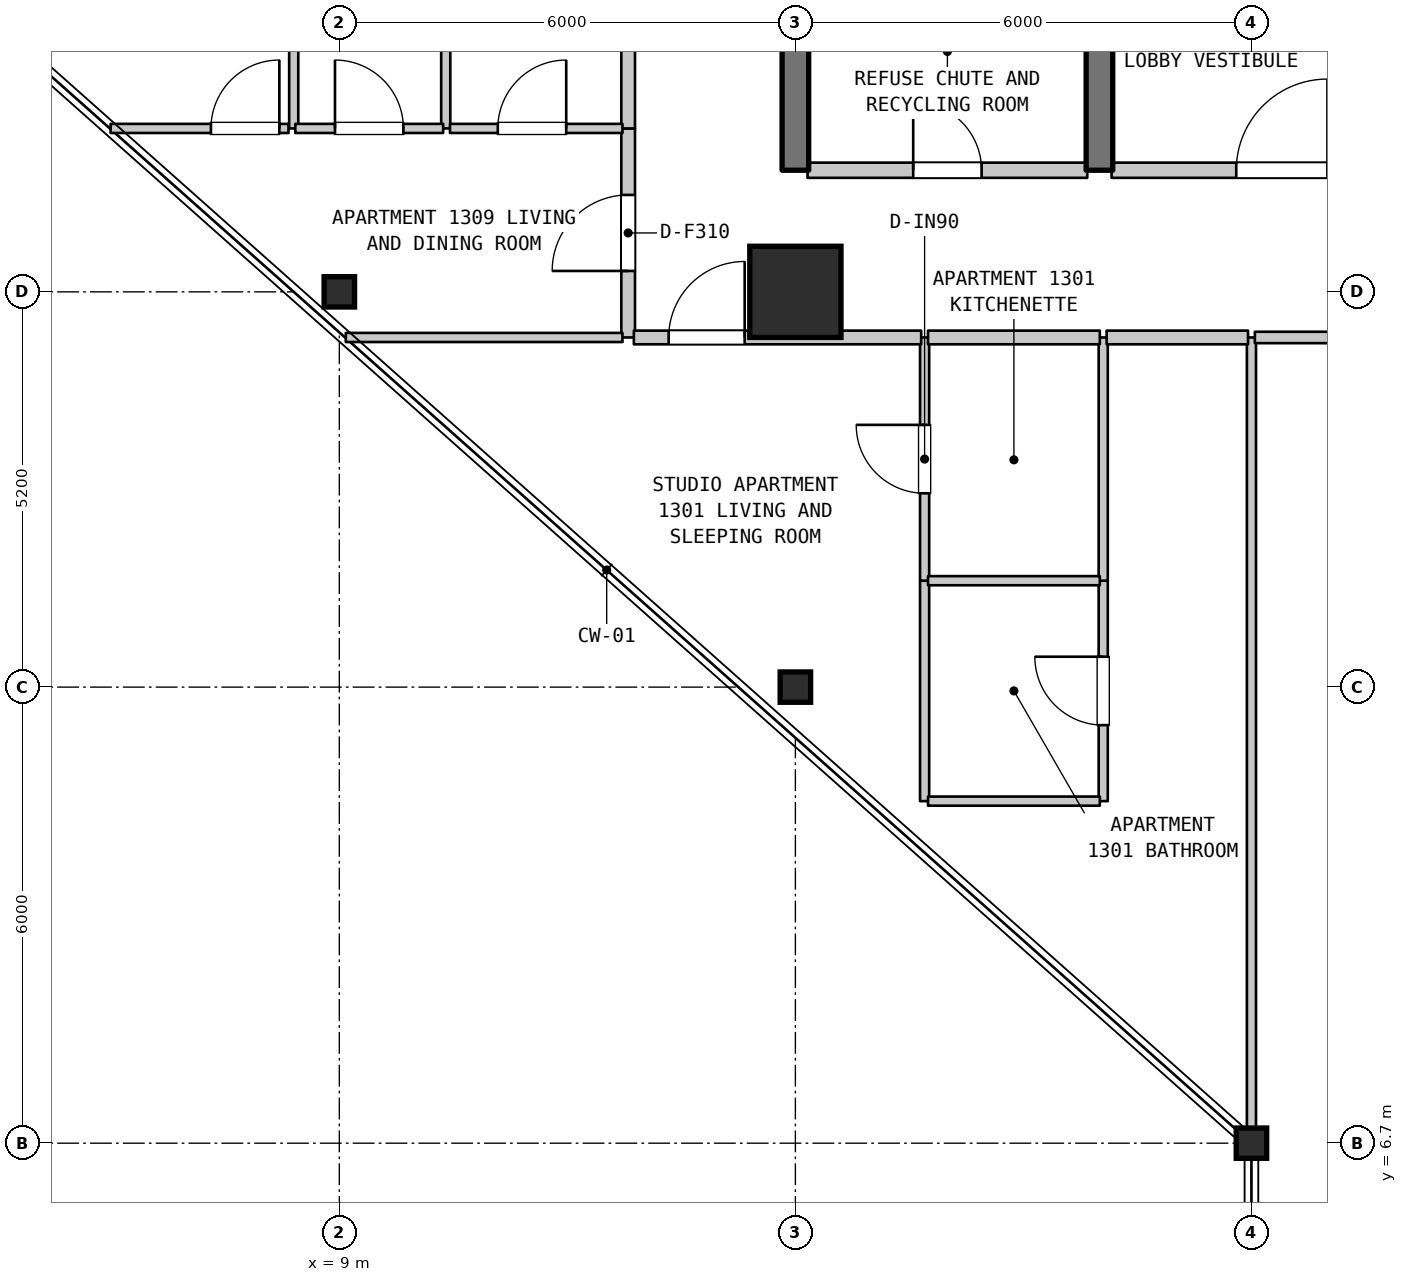
"""IFC4 building model, lengths in metres.
Left out: names, types, materials, properties, quantities, classifications, styles, units other than length and angle.
Written with IfcOpenShell. Run it as: python <this file> out.ifc"""

import sys

from ifc_helpers import new_model, si_unit, direction, frame, frame_2d, origin, origin_2d, place, context, subcontext, project, spatial, rectangle, i_section, extrude, element, fill, save


model = new_model("IFC4")
c1 = context("Model", 3, precision=1e-05, world=origin(), true_north=direction((0.0, 1.0)))
c2 = subcontext(c1, "Body", "Model", "MODEL_VIEW")
j1 = project(units=[si_unit("LENGTHUNIT", "METRE"), si_unit("PLANEANGLEUNIT", "RADIAN")], contexts=[c1])
p1 = place(None, origin())
s1 = spatial("IfcSite", under=j1, at=p1, CompositionType="ELEMENT")
p2 = place(p1, origin())
s2 = spatial("IfcBuilding", under=s1, at=p2, CompositionType="ELEMENT")
p3 = place(p2, frame((0.0, 0.0, 57.3)))
s3 = spatial("IfcBuildingStorey", under=s2, at=p3, CompositionType="ELEMENT", Elevation=57.3)
for number, where, z_axis, x_axis in (
    (1, (9.0, 17.9, 0.0), (0.0, 0.0, 1.0), (1.0, 0.0, 0.0)),
    (2, (15.0, 12.7, 0.0), (0.0, 0.0, 1.0), (1.0, 0.0, 0.0)),
):
    element("IfcColumn", number, at=place(p3, frame(where, z_axis=z_axis, x_axis=x_axis)), inside=s3, PredefinedType="COLUMN", context=c2, shape_type="SweptSolid", body=[
        extrude(i_section(OverallWidth=0.401, OverallDepth=0.399, WebThickness=0.025, FlangeThickness=0.04, FilletRadius=0.015, at=origin_2d()), origin(), (0.0, 0.0, 1.0), 3.7),
    ])
p4 = place(p3, frame((15.0, 17.9, 0.0), z_axis=(0.0, 0.0, 1.0), x_axis=(1.0, 0.0, 0.0)))
e3 = element("IfcColumn", 3, at=p4, inside=s3, PredefinedType="COLUMN", context=c2, shape_type="SweptSolid", body=[
    extrude(rectangle(XDim=1.2, YDim=1.2, at=origin_2d()), origin(), (0.0, 0.0, 1.0), 3.7),
])
p5 = place(p3, frame((21.0, 6.7, 0.0), z_axis=(0.0, 0.0, 1.0), x_axis=(1.0, 0.0, 0.0)))
e4 = element("IfcColumn", 4, at=p5, inside=s3, PredefinedType="COLUMN", context=c2, shape_type="SweptSolid", body=[
    extrude(i_section(OverallWidth=0.401, OverallDepth=0.399, WebThickness=0.025, FlangeThickness=0.04, FilletRadius=0.015, at=origin_2d()), origin(), (0.0, 0.0, 1.0), 3.7),
])
for number, where, z_axis, x_axis in (
    (5, (8.4, 20.05, 0.0), (0.0, 0.0, 1.0), (0.0, 1.0, 0.0)),
    (6, (10.4, 20.05, 0.0), (0.0, 0.0, 1.0), (0.0, 1.0, 0.0)),
):
    element("IfcWall", number, at=place(p3, frame(where, z_axis=z_axis, x_axis=x_axis)), inside=s3, PredefinedType="PARTITIONING", context=c2, shape_type="SweptSolid", body=[
        extrude(rectangle(XDim=3.36, YDim=0.12, at=frame_2d((1.68, 0.0))), origin(), (0.0, 0.0, 1.0), 3.28),
    ])
p6 = place(p3, frame((12.8, 17.3, 0.0), z_axis=(0.0, 0.0, 1.0), x_axis=(0.0, 1.0, 0.0)))
e7 = element("IfcWall", 7, at=p6, inside=s3, PredefinedType="STANDARD", context=c2, shape_type="SweptSolid", body=[
    extrude(rectangle(XDim=2.75, YDim=0.18, at=frame_2d((1.375, 0.0))), origin(), (0.0, 0.0, 1.0), 3.28),
])
p7 = place(p6, frame((0.875, 0.0, 0.0)))
e8 = element("IfcOpeningElement", 8, at=p7, cuts=e7, PredefinedType="OPENING", context=c2, shape_type="SweptSolid", body=[
    extrude(rectangle(XDim=1.0, YDim=2.15, at=frame_2d((0.5, 1.075))), frame((0.0, 0.1, 0.0), z_axis=(0.0, -1.0, 0.0), x_axis=(1.0, 0.0, 0.0)), (0.0, 0.0, 1.0), 0.2),
])
p8 = place(p3, frame((12.8, 20.05, 0.0), z_axis=(0.0, 0.0, 1.0), x_axis=(0.0, 1.0, 0.0)))
e9 = element("IfcWall", 9, at=p8, inside=s3, PredefinedType="STANDARD", context=c2, shape_type="SweptSolid", body=[
    extrude(rectangle(XDim=3.36, YDim=0.18, at=frame_2d((1.68, 0.0))), origin(), (0.0, 0.0, 1.0), 3.28),
])
p9 = place(p3, frame((15.0, 19.5, 0.0), z_axis=(0.0, 0.0, 1.0), x_axis=(0.0, 1.0, 0.0)))
e10 = element("IfcWall", 10, at=p9, inside=s3, PredefinedType="SHEAR", context=c2, shape_type="SweptSolid", body=[
    extrude(rectangle(XDim=3.2, YDim=0.35, at=frame_2d((1.6, 0.0))), origin(), (0.0, 0.0, 1.0), 3.28),
])
p10 = place(p3, frame((16.7, 11.2, 0.0), z_axis=(0.0, 0.0, 1.0), x_axis=(0.0, 1.0, 0.0)))
e11 = element("IfcWall", 11, at=p10, inside=s3, PredefinedType="PARTITIONING", context=c2, shape_type="SweptSolid", body=[
    extrude(rectangle(XDim=2.9, YDim=0.12, at=frame_2d((1.45, 0.0))), origin(), (0.0, 0.0, 1.0), 3.28),
])
p11 = place(p3, frame((16.7, 14.1, 0.0), z_axis=(0.0, 0.0, 1.0), x_axis=(0.0, 1.0, 0.0)))
e12 = element("IfcWall", 12, at=p11, inside=s3, PredefinedType="PARTITIONING", context=c2, shape_type="SweptSolid", body=[
    extrude(rectangle(XDim=3.2, YDim=0.12, at=frame_2d((1.6, 0.0))), origin(), (0.0, 0.0, 1.0), 3.28),
])
p12 = place(p11, frame((1.15, 0.0, 0.0)))
e13 = element("IfcOpeningElement", 13, at=p12, cuts=e12, PredefinedType="OPENING", context=c2, shape_type="SweptSolid", body=[
    extrude(rectangle(XDim=0.9, YDim=2.15, at=frame_2d((0.45, 1.075))), frame((0.0, 0.07, 0.0), z_axis=(0.0, -1.0, 0.0), x_axis=(1.0, 0.0, 0.0)), (0.0, 0.0, 1.0), 0.14),
])
p13 = place(p3, frame((19.0, 19.5, 0.0), z_axis=(0.0, 0.0, 1.0), x_axis=(0.0, 1.0, 0.0)))
e14 = element("IfcWall", 14, at=p13, inside=s3, PredefinedType="SHEAR", context=c2, shape_type="SweptSolid", body=[
    extrude(rectangle(XDim=3.2, YDim=0.35, at=frame_2d((1.6, 0.0))), origin(), (0.0, 0.0, 1.0), 3.28),
])
p14 = place(p3, frame((19.05, 11.2, 0.0), z_axis=(0.0, 0.0, 1.0), x_axis=(0.0, 1.0, 0.0)))
e15 = element("IfcWall", 15, at=p14, inside=s3, PredefinedType="PARTITIONING", context=c2, shape_type="SweptSolid", body=[
    extrude(rectangle(XDim=2.9, YDim=0.12, at=frame_2d((1.45, 0.0))), origin(), (0.0, 0.0, 1.0), 3.28),
])
p15 = place(p14, frame((1.0, 0.0, 0.0)))
e16 = element("IfcOpeningElement", 16, at=p15, cuts=e15, PredefinedType="OPENING", context=c2, shape_type="SweptSolid", body=[
    extrude(rectangle(XDim=0.9, YDim=2.1, at=frame_2d((0.45, 1.05))), frame((0.0, 0.07, 0.0), z_axis=(0.0, -1.0, 0.0), x_axis=(1.0, 0.0, 0.0)), (0.0, 0.0, 1.0), 0.14),
])
p16 = place(p3, frame((19.05, 14.1, 0.0), z_axis=(0.0, 0.0, 1.0), x_axis=(0.0, 1.0, 0.0)))
e17 = element("IfcWall", 17, at=p16, inside=s3, PredefinedType="PARTITIONING", context=c2, shape_type="SweptSolid", body=[
    extrude(rectangle(XDim=3.2, YDim=0.12, at=frame_2d((1.6, 0.0))), origin(), (0.0, 0.0, 1.0), 3.28),
])
p17 = place(p3, frame((21.0, 6.71, 0.0), z_axis=(0.0, 0.0, 1.0), x_axis=(0.0, 1.0, 0.0)))
e18 = element("IfcWall", 18, at=p17, inside=s3, PredefinedType="PARTITIONING", context=c2, shape_type="SweptSolid", body=[
    extrude(rectangle(XDim=10.59, YDim=0.12, at=frame_2d((5.295, 0.0))), origin(), (0.0, 0.0, 1.0), 3.28),
])
for number, where, z_axis, x_axis in (
    (19, (16.745, 11.2, 0.0), (0.0, 0.0, 1.0), (1.0, 0.0, 0.0)),
    (20, (16.745, 14.1, 0.0), (0.0, 0.0, 1.0), (1.0, 0.0, 0.0)),
):
    element("IfcWall", number, at=place(p3, frame(where, z_axis=z_axis, x_axis=x_axis)), inside=s3, PredefinedType="PARTITIONING", context=c2, shape_type="SweptSolid", body=[
        extrude(rectangle(XDim=2.26, YDim=0.12, at=frame_2d((1.13, 0.0))), origin(), (0.0, 0.0, 1.0), 3.28),
    ])
p18 = place(p3, frame((9.085, 17.3, 0.0), z_axis=(0.0, 0.0, 1.0), x_axis=(1.0, 0.0, 0.0)))
e21 = element("IfcWall", 21, at=p18, inside=s3, PredefinedType="PARTITIONING", context=c2, shape_type="SweptSolid", body=[
    extrude(rectangle(XDim=3.64, YDim=0.12, at=frame_2d((1.82, 0.0))), origin(), (0.0, 0.0, 1.0), 3.28),
])
p19 = place(p3, frame((12.875, 17.3, 0.0), z_axis=(0.0, 0.0, 1.0), x_axis=(1.0, 0.0, 0.0)))
e22 = element("IfcWall", 22, at=p19, inside=s3, PredefinedType="STANDARD", context=c2, shape_type="SweptSolid", body=[
    extrude(rectangle(XDim=3.78, YDim=0.18, at=frame_2d((1.89, 0.0))), origin(), (0.0, 0.0, 1.0), 3.28),
])
p20 = place(p19, frame((0.458, 0.0, 0.0)))
e23 = element("IfcOpeningElement", 23, at=p20, cuts=e22, PredefinedType="OPENING", context=c2, shape_type="SweptSolid", body=[
    extrude(rectangle(XDim=1.0, YDim=2.15, at=frame_2d((0.5, 1.075))), frame((0.0, 0.1, 0.0), z_axis=(0.0, -1.0, 0.0), x_axis=(1.0, 0.0, 0.0)), (0.0, 0.0, 1.0), 0.2),
])
p21 = place(p3, frame((16.745, 17.3, 0.0), z_axis=(0.0, 0.0, 1.0), x_axis=(1.0, 0.0, 0.0)))
e24 = element("IfcWall", 24, at=p21, inside=s3, PredefinedType="STANDARD", context=c2, shape_type="SweptSolid", body=[
    extrude(rectangle(XDim=2.26, YDim=0.18, at=frame_2d((1.13, 0.0))), origin(), (0.0, 0.0, 1.0), 3.28),
])
p22 = place(p3, frame((19.095, 17.3, 0.0), z_axis=(0.0, 0.0, 1.0), x_axis=(1.0, 0.0, 0.0)))
e25 = element("IfcWall", 25, at=p22, inside=s3, PredefinedType="STANDARD", context=c2, shape_type="SweptSolid", body=[
    extrude(rectangle(XDim=1.86, YDim=0.18, at=frame_2d((0.93, 0.0))), origin(), (0.0, 0.0, 1.0), 3.28),
])
p23 = place(p3, frame((21.045, 17.3, 0.0), z_axis=(0.0, 0.0, 1.0), x_axis=(1.0, 0.0, 0.0)))
e26 = element("IfcWall", 26, at=p23, inside=s3, PredefinedType="STANDARD", context=c2, shape_type="SweptSolid", body=[
    extrude(rectangle(XDim=6.51, YDim=0.15, at=frame_2d((3.255, 0.0))), origin(), (0.0, 0.0, 1.0), 3.28),
])
p24 = place(p23, frame((2.755, 0.0, 0.0)))
e27 = element("IfcOpeningElement", 27, at=p24, cuts=e26, PredefinedType="OPENING", context=c2, shape_type="SweptSolid", body=[
    extrude(rectangle(XDim=1.0, YDim=2.15, at=frame_2d((0.5, 1.075))), frame((0.0, 0.085, 0.0), z_axis=(0.0, -1.0, 0.0), x_axis=(1.0, 0.0, 0.0)), (0.0, 0.0, 1.0), 0.17),
])
p25 = place(p3, frame((15.16, 19.5, 0.0), z_axis=(0.0, 0.0, 1.0), x_axis=(1.0, 0.0, 0.0)))
e28 = element("IfcWall", 28, at=p25, inside=s3, PredefinedType="STANDARD", context=c2, shape_type="SweptSolid", body=[
    extrude(rectangle(XDim=3.68, YDim=0.2, at=frame_2d((1.84, 0.0))), origin(), (0.0, 0.0, 1.0), 3.28),
])
p26 = place(p25, frame((1.39, 0.0, 0.0)))
e29 = element("IfcOpeningElement", 29, at=p26, cuts=e28, PredefinedType="OPENING", context=c2, shape_type="SweptSolid", body=[
    extrude(rectangle(XDim=0.9, YDim=2.15, at=frame_2d((0.45, 1.075))), frame((0.0, 0.11, 0.0), z_axis=(0.0, -1.0, 0.0), x_axis=(1.0, 0.0, 0.0)), (0.0, 0.0, 1.0), 0.22),
])
p27 = place(p3, frame((19.16, 19.5, 0.0), z_axis=(0.0, 0.0, 1.0), x_axis=(1.0, 0.0, 0.0)))
e30 = element("IfcWall", 30, at=p27, inside=s3, PredefinedType="STANDARD", context=c2, shape_type="SweptSolid", body=[
    extrude(rectangle(XDim=4.48, YDim=0.2, at=frame_2d((2.24, 0.0))), origin(), (0.0, 0.0, 1.0), 3.28),
])
p28 = place(p27, frame((1.64, 0.0, 0.0)))
e31 = element("IfcOpeningElement", 31, at=p28, cuts=e30, PredefinedType="OPENING", context=c2, shape_type="SweptSolid", body=[
    extrude(rectangle(XDim=1.2, YDim=2.2, at=frame_2d((0.6, 1.1))), frame((0.0, 0.11, 0.0), z_axis=(0.0, -1.0, 0.0), x_axis=(1.0, 0.0, 0.0)), (0.0, 0.0, 1.0), 0.22),
])
p29 = place(p3, frame((5.991, 20.05, 0.0), z_axis=(0.0, 0.0, 1.0), x_axis=(1.0, 0.0, 0.0)))
e32 = element("IfcWall", 32, at=p29, inside=s3, PredefinedType="PARTITIONING", context=c2, shape_type="SweptSolid", body=[
    extrude(rectangle(XDim=2.34, YDim=0.12, at=frame_2d((1.17, 0.0))), origin(), (0.0, 0.0, 1.0), 3.28),
])
p30 = place(p29, frame((1.32, 0.0, 0.0)))
e33 = element("IfcOpeningElement", 33, at=p30, cuts=e32, PredefinedType="OPENING", context=c2, shape_type="SweptSolid", body=[
    extrude(rectangle(XDim=0.9, YDim=2.15, at=frame_2d((0.45, 1.075))), frame((0.0, 0.07, 0.0), z_axis=(0.0, -1.0, 0.0), x_axis=(1.0, 0.0, 0.0)), (0.0, 0.0, 1.0), 0.14),
])
p31 = place(p3, frame((8.421, 20.05, 0.0), z_axis=(0.0, 0.0, 1.0), x_axis=(1.0, 0.0, 0.0)))
e34 = element("IfcWall", 34, at=p31, inside=s3, PredefinedType="PARTITIONING", context=c2, shape_type="SweptSolid", body=[
    extrude(rectangle(XDim=1.945, YDim=0.12, at=frame_2d((0.973, 0.0))), origin(), (0.0, 0.0, 1.0), 3.28),
])
p32 = place(p31, frame((0.522, 0.0, 0.0)))
e35 = element("IfcOpeningElement", 35, at=p32, cuts=e34, PredefinedType="OPENING", context=c2, shape_type="SweptSolid", body=[
    extrude(rectangle(XDim=0.9, YDim=2.15, at=frame_2d((0.45, 1.075))), frame((0.0, 0.07, 0.0), z_axis=(0.0, -1.0, 0.0), x_axis=(1.0, 0.0, 0.0)), (0.0, 0.0, 1.0), 0.14),
])
p33 = place(p3, frame((10.456, 20.05, 0.0), z_axis=(0.0, 0.0, 1.0), x_axis=(1.0, 0.0, 0.0)))
e36 = element("IfcWall", 36, at=p33, inside=s3, PredefinedType="PARTITIONING", context=c2, shape_type="SweptSolid", body=[
    extrude(rectangle(XDim=2.269, YDim=0.12, at=frame_2d((1.135, 0.0))), origin(), (0.0, 0.0, 1.0), 3.28),
])
p34 = place(p33, frame((0.629, 0.0, 0.0)))
e37 = element("IfcOpeningElement", 37, at=p34, cuts=e36, PredefinedType="OPENING", context=c2, shape_type="SweptSolid", body=[
    extrude(rectangle(XDim=0.9, YDim=2.1, at=frame_2d((0.45, 1.05))), frame((0.0, 0.07, 0.0), z_axis=(0.0, -1.0, 0.0), x_axis=(1.0, 0.0, 0.0)), (0.0, 0.0, 1.0), 0.14),
])
p35 = place(p7, origin())
e38 = element("IfcDoor", 38, at=p35, inside=s3, OperationType="SINGLE_SWING_LEFT", PredefinedType="DOOR", context=c2, shape_type="SweptSolid", body=[
    extrude(rectangle(XDim=1.0, YDim=2.15, at=frame_2d((0.5, 1.075))), frame((0.0, 0.025, 0.0), z_axis=(0.0, -1.0, 0.0), x_axis=(1.0, 0.0, 0.0)), (0.0, 0.0, 1.0), 0.05),
])
fill(e8, e38)
p36 = place(p12, origin())
e39 = element("IfcDoor", 39, at=p36, inside=s3, OperationType="SINGLE_SWING_RIGHT", PredefinedType="DOOR", context=c2, shape_type="SweptSolid", body=[
    extrude(rectangle(XDim=0.9, YDim=2.15, at=frame_2d((0.45, 1.075))), frame((0.0, 0.025, 0.0), z_axis=(0.0, -1.0, 0.0), x_axis=(1.0, 0.0, 0.0)), (0.0, 0.0, 1.0), 0.05),
])
fill(e13, e39)
p37 = place(p15, origin())
e40 = element("IfcDoor", 40, at=p37, inside=s3, OperationType="SINGLE_SWING_RIGHT", PredefinedType="DOOR", context=c2, shape_type="SweptSolid", body=[
    extrude(rectangle(XDim=0.9, YDim=2.1, at=frame_2d((0.45, 1.05))), frame((0.0, 0.025, 0.0), z_axis=(0.0, -1.0, 0.0), x_axis=(1.0, 0.0, 0.0)), (0.0, 0.0, 1.0), 0.05),
])
fill(e16, e40)
p38 = place(p20, origin())
e41 = element("IfcDoor", 41, at=p38, inside=s3, OperationType="SINGLE_SWING_RIGHT", PredefinedType="DOOR", context=c2, shape_type="SweptSolid", body=[
    extrude(rectangle(XDim=1.0, YDim=2.15, at=frame_2d((0.5, 1.075))), frame((0.0, 0.025, 0.0), z_axis=(0.0, -1.0, 0.0), x_axis=(1.0, 0.0, 0.0)), (0.0, 0.0, 1.0), 0.05),
])
fill(e23, e41)
p39 = place(p26, origin())
e42 = element("IfcDoor", 42, at=p39, inside=s3, OperationType="SINGLE_SWING_LEFT", PredefinedType="DOOR", context=c2, shape_type="SweptSolid", body=[
    extrude(rectangle(XDim=0.9, YDim=2.15, at=frame_2d((0.45, 1.075))), frame((0.0, 0.025, 0.0), z_axis=(0.0, -1.0, 0.0), x_axis=(1.0, 0.0, 0.0)), (0.0, 0.0, 1.0), 0.05),
])
fill(e29, e42)
p40 = place(p28, origin())
e43 = element("IfcDoor", 43, at=p40, inside=s3, OperationType="SINGLE_SWING_RIGHT", PredefinedType="DOOR", context=c2, shape_type="SweptSolid", body=[
    extrude(rectangle(XDim=1.2, YDim=2.2, at=frame_2d((0.6, 1.1))), frame((0.0, 0.025, 0.0), z_axis=(0.0, -1.0, 0.0), x_axis=(1.0, 0.0, 0.0)), (0.0, 0.0, 1.0), 0.05),
])
fill(e31, e43)
p41 = place(p30, origin())
e44 = element("IfcDoor", 44, at=p41, inside=s3, OperationType="SINGLE_SWING_RIGHT", PredefinedType="DOOR", context=c2, shape_type="SweptSolid", body=[
    extrude(rectangle(XDim=0.9, YDim=2.15, at=frame_2d((0.45, 1.075))), frame((0.0, 0.025, 0.0), z_axis=(0.0, -1.0, 0.0), x_axis=(1.0, 0.0, 0.0)), (0.0, 0.0, 1.0), 0.05),
])
fill(e33, e44)
p42 = place(p32, origin())
e45 = element("IfcDoor", 45, at=p42, inside=s3, OperationType="SINGLE_SWING_LEFT", PredefinedType="DOOR", context=c2, shape_type="SweptSolid", body=[
    extrude(rectangle(XDim=0.9, YDim=2.15, at=frame_2d((0.45, 1.075))), frame((0.0, 0.025, 0.0), z_axis=(0.0, -1.0, 0.0), x_axis=(1.0, 0.0, 0.0)), (0.0, 0.0, 1.0), 0.05),
])
fill(e35, e45)
p43 = place(p34, origin())
e46 = element("IfcDoor", 46, at=p43, inside=s3, OperationType="SINGLE_SWING_RIGHT", PredefinedType="DOOR", context=c2, shape_type="SweptSolid", body=[
    extrude(rectangle(XDim=0.9, YDim=2.1, at=frame_2d((0.45, 1.05))), frame((0.0, 0.025, 0.0), z_axis=(0.0, -1.0, 0.0), x_axis=(1.0, 0.0, 0.0)), (0.0, 0.0, 1.0), 0.05),
])
fill(e37, e46)
save(model, sys.argv[1])
